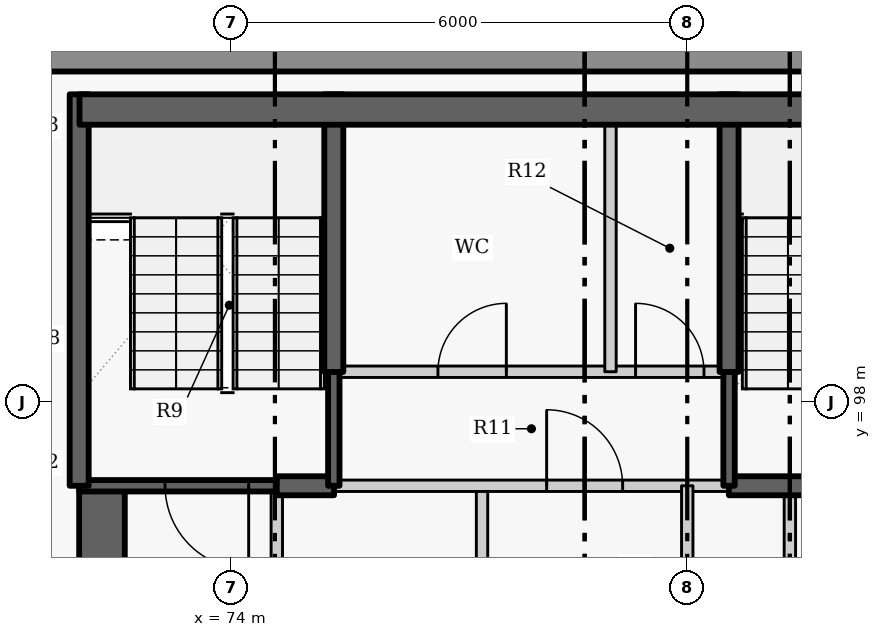
"""IFC4 building model, lengths in metres.
Left out: names, types, materials, properties, quantities, classifications, styles, units other than length and angle.
Written with IfcOpenShell. Run it as: python <this file> out.ifc"""

import sys

from ifc_helpers import new_model, si_unit, direction, frame, frame_2d, origin, place, context, subcontext, project, spatial, rectangle, extrude, element, fill, save


model = new_model("IFC4")
c1 = context("Model", 3, precision=1e-05, world=origin(), true_north=direction((0.0, 1.0)))
c2 = subcontext(c1, "Body", "Model", "MODEL_VIEW")
j1 = project(units=[si_unit("LENGTHUNIT", "METRE"), si_unit("PLANEANGLEUNIT", "RADIAN")], contexts=[c1])
p1 = place(None, origin())
s1 = spatial("IfcSite", under=j1, at=p1, CompositionType="ELEMENT")
p2 = place(p1, origin())
s2 = spatial("IfcBuilding", under=s1, at=p2, CompositionType="ELEMENT")
p3 = place(p2, frame((0.0, 0.0, 272.4)))
s3 = spatial("IfcBuildingStorey", under=s2, at=p3, CompositionType="ELEMENT", Elevation=272.4)
p4 = place(p3, frame((89.549, 102.5, 0.0), z_axis=(0.0, 0.0, 1.0), x_axis=(-1.0, 0.0, 0.0)))
e1 = element("IfcWall", 1, at=p4, inside=s3, PredefinedType="SOLIDWALL", context=c2, shape_type="SweptSolid", body=[
    extrude(rectangle(XDim=19.134, YDim=0.3, at=frame_2d((9.567, 0.0))), origin(), (0.0, 0.0, 1.0), 2.725),
])
p5 = place(p3, frame((74.6, 94.1, 0.0), z_axis=(0.0, 0.0, 1.0), x_axis=(0.0, 1.0, 0.0)))
e2 = element("IfcWall", 2, at=p5, inside=s3, PredefinedType="PARTITIONING", context=c2, shape_type="SweptSolid", body=[
    extrude(rectangle(XDim=2.8, YDim=0.15, at=frame_2d((1.4, 0.0))), origin(), (0.0, 0.0, 1.0), 3.325),
])
p6 = place(p3, frame((72.3, 87.8, -0.275), z_axis=(0.0, 0.0, 1.0), x_axis=(0.0, 1.0, 0.0)))
e3 = element("IfcWall", 3, at=p6, inside=s3, PredefinedType="SHEAR", context=c2, shape_type="SweptSolid", body=[
    extrude(rectangle(XDim=9.1, YDim=0.6, at=frame_2d((4.55, 0.0))), origin(), (0.0, 0.0, 1.0), 3.6),
])
p7 = place(p6, frame((3.85, 0.0, 0.275)))
e4 = element("IfcOpeningElement", 4, at=p7, cuts=e3, PredefinedType="OPENING", context=c2, shape_type="SweptSolid", body=[
    extrude(rectangle(XDim=1.5, YDim=2.1, at=frame_2d((0.75, 1.05))), frame((0.0, 0.31, 0.0), z_axis=(0.0, -1.0, 0.0), x_axis=(1.0, 0.0, 0.0)), (0.0, 0.0, 1.0), 0.62),
])
p8 = place(p3, frame((74.6, 96.9, -0.275), z_axis=(0.0, 0.0, 1.0), x_axis=(-1.0, 0.0, 0.0)))
e5 = element("IfcWall", 5, at=p8, inside=s3, PredefinedType="SHEAR", context=c2, shape_type="SweptSolid", body=[
    extrude(rectangle(XDim=2.6, YDim=0.15, at=frame_2d((1.3, 0.0))), origin(), (0.0, 0.0, 1.0), 3.6),
])
p9 = place(p8, frame((0.37, 0.0, 0.275)))
e6 = element("IfcOpeningElement", 6, at=p9, cuts=e5, PredefinedType="OPENING", context=c2, shape_type="SweptSolid", body=[
    extrude(rectangle(XDim=1.1, YDim=2.1, at=frame_2d((0.55, 1.05))), frame((0.0, 0.085, 0.0), z_axis=(0.0, -1.0, 0.0), x_axis=(1.0, 0.0, 0.0)), (0.0, 0.0, 1.0), 0.17),
])
p10 = place(p3, frame((77.3, 94.1, 0.0), z_axis=(0.0, 0.0, 1.0), x_axis=(0.0, 1.0, 0.0)))
e7 = element("IfcWall", 7, at=p10, inside=s3, PredefinedType="PARTITIONING", context=c2, shape_type="SweptSolid", body=[
    extrude(rectangle(XDim=2.8, YDim=0.15, at=frame_2d((1.4, 0.0))), origin(), (0.0, 0.0, 1.0), 3.325),
])
p11 = place(p3, frame((74.6, 96.9, -0.275), z_axis=(0.0, 0.0, 1.0), x_axis=(1.0, 0.0, 0.0)))
e8 = element("IfcWall", 8, at=p11, inside=s3, PredefinedType="SHEAR", context=c2, shape_type="SweptSolid", body=[
    extrude(rectangle(XDim=0.753, YDim=0.25, at=frame_2d((0.376, 0.0))), origin(), (0.0, 0.0, 1.0), 3.6),
])
p12 = place(p3, frame((80.547, 96.9, -0.275), z_axis=(0.0, 0.0, 1.0), x_axis=(1.0, 0.0, 0.0)))
e9 = element("IfcWall", 9, at=p12, inside=s3, PredefinedType="SHEAR", context=c2, shape_type="SweptSolid", body=[
    extrude(rectangle(XDim=7.453, YDim=0.25, at=frame_2d((3.727, 0.0))), origin(), (0.0, 0.0, 1.0), 3.6),
])
p13 = place(p12, frame((3.302, 0.0, 0.275)))
e10 = element("IfcOpeningElement", 10, at=p13, cuts=e9, PredefinedType="OPENING", context=c2, shape_type="SweptSolid", body=[
    extrude(rectangle(XDim=1.1, YDim=2.1, at=frame_2d((0.55, 1.05))), frame((0.0, 0.135, 0.0), z_axis=(0.0, -1.0, 0.0), x_axis=(1.0, 0.0, 0.0)), (0.0, 0.0, 1.0), 0.27),
])
p14 = place(p3, frame((75.347, 96.9, 0.0), z_axis=(0.0, 0.0, 1.0), x_axis=(1.0, 0.0, 0.0)))
e11 = element("IfcWall", 11, at=p14, inside=s3, PredefinedType="PARTITIONING", context=c2, shape_type="SweptSolid", body=[
    extrude(rectangle(XDim=5.206, YDim=0.15, at=frame_2d((2.603, 0.0))), origin(), (0.0, 0.0, 1.0), 3.325),
])
p15 = place(p14, frame((2.803, 0.0, 0.0)))
e12 = element("IfcOpeningElement", 12, at=p15, cuts=e11, PredefinedType="OPENING", context=c2, shape_type="SweptSolid", body=[
    extrude(rectangle(XDim=1.0, YDim=2.1, at=frame_2d((0.5, 1.05))), frame((0.0, 0.085, 0.0), z_axis=(0.0, -1.0, 0.0), x_axis=(1.0, 0.0, 0.0)), (0.0, 0.0, 1.0), 0.17),
])
for number, where, z_axis, x_axis in (
    (13, (80.0, 94.1, 0.0), (0.0, 0.0, 1.0), (0.0, 1.0, 0.0)),
    (14, (81.35, 94.1, 0.0), (0.0, 0.0, 1.0), (0.0, 1.0, 0.0)),
):
    element("IfcWall", number, at=place(p3, frame(where, z_axis=z_axis, x_axis=x_axis)), inside=s3, PredefinedType="PARTITIONING", context=c2, shape_type="SweptSolid", body=[
        extrude(rectangle(XDim=2.8, YDim=0.15, at=frame_2d((1.4, 0.0))), origin(), (0.0, 0.0, 1.0), 3.325),
    ])
p16 = place(p3, frame((75.35, 96.9, -0.275), z_axis=(0.0, 0.0, 1.0), x_axis=(0.0, 1.0, 0.0)))
e15 = element("IfcWall", 15, at=p16, inside=s3, PredefinedType="SHEAR", context=c2, shape_type="SweptSolid", body=[
    extrude(rectangle(XDim=1.503, YDim=0.15, at=frame_2d((0.751, 0.0))), origin(), (0.0, 0.0, 1.0), 3.6),
])
p17 = place(p3, frame((75.35, 98.397, -0.275), z_axis=(0.0, 0.0, 1.0), x_axis=(0.0, 1.0, 0.0)))
e16 = element("IfcWall", 16, at=p17, inside=s3, PredefinedType="SHEAR", context=c2, shape_type="SweptSolid", body=[
    extrude(rectangle(XDim=3.653, YDim=0.25, at=frame_2d((1.827, 0.0))), origin(), (0.0, 0.0, 1.0), 3.6),
])
p18 = place(p3, frame((72.0, 96.9, -0.275), z_axis=(0.0, 0.0, 1.0), x_axis=(0.0, 1.0, 0.0)))
e17 = element("IfcWall", 17, at=p18, inside=s3, PredefinedType="SHEAR", context=c2, shape_type="SweptSolid", body=[
    extrude(rectangle(XDim=5.15, YDim=0.25, at=frame_2d((2.575, 0.0))), origin(), (0.0, 0.0, 1.0), 3.6),
])
p19 = place(p3, frame((80.55, 96.9, -0.275), z_axis=(0.0, 0.0, 1.0), x_axis=(0.0, 1.0, 0.0)))
e18 = element("IfcWall", 18, at=p19, inside=s3, PredefinedType="SHEAR", context=c2, shape_type="SweptSolid", body=[
    extrude(rectangle(XDim=1.503, YDim=0.15, at=frame_2d((0.751, 0.0))), origin(), (0.0, 0.0, 1.0), 3.6),
])
p20 = place(p3, frame((80.55, 98.397, -0.275), z_axis=(0.0, 0.0, 1.0), x_axis=(0.0, 1.0, 0.0)))
e19 = element("IfcWall", 19, at=p20, inside=s3, PredefinedType="SHEAR", context=c2, shape_type="SweptSolid", body=[
    extrude(rectangle(XDim=3.653, YDim=0.25, at=frame_2d((1.827, 0.0))), origin(), (0.0, 0.0, 1.0), 3.6),
])
p21 = place(p3, frame((75.35, 98.4, 0.0), z_axis=(0.0, 0.0, 1.0), x_axis=(1.0, 0.0, 0.0)))
e20 = element("IfcWall", 20, at=p21, inside=s3, PredefinedType="PARTITIONING", context=c2, shape_type="SweptSolid", body=[
    extrude(rectangle(XDim=5.2, YDim=0.15, at=frame_2d((2.6, 0.0))), origin(), (0.0, 0.0, 1.0), 3.325),
])
p22 = place(p21, frame((1.37, 0.0, 0.0)))
e21 = element("IfcOpeningElement", 21, at=p22, cuts=e20, PredefinedType="OPENING", context=c2, shape_type="SweptSolid", body=[
    extrude(rectangle(XDim=0.9, YDim=2.1, at=frame_2d((0.45, 1.05))), frame((0.0, 0.085, 0.0), z_axis=(0.0, -1.0, 0.0), x_axis=(1.0, 0.0, 0.0)), (0.0, 0.0, 1.0), 0.17),
])
p23 = place(p21, frame((3.97, 0.0, 0.0)))
e22 = element("IfcOpeningElement", 22, at=p23, cuts=e20, PredefinedType="OPENING", context=c2, shape_type="SweptSolid", body=[
    extrude(rectangle(XDim=0.9, YDim=2.1, at=frame_2d((0.45, 1.05))), frame((0.0, 0.085, 0.0), z_axis=(0.0, -1.0, 0.0), x_axis=(1.0, 0.0, 0.0)), (0.0, 0.0, 1.0), 0.17),
])
p24 = place(p3, frame((78.99, 98.4, 0.0), z_axis=(0.0, 0.0, 1.0), x_axis=(0.0, 1.0, 0.0)))
e23 = element("IfcWall", 23, at=p24, inside=s3, PredefinedType="PARTITIONING", context=c2, shape_type="SweptSolid", body=[
    extrude(rectangle(XDim=3.65, YDim=0.15, at=frame_2d((1.825, 0.0))), origin(), (0.0, 0.0, 1.0), 3.325),
])
p25 = place(p3, frame((72.004, 101.85, -0.275), z_axis=(0.0, 0.0, 1.0), x_axis=(1.0, 0.0, 0.0)))
e24 = element("IfcWall", 24, at=p25, inside=s3, PredefinedType="SHEAR", context=c2, shape_type="SweptSolid", body=[
    extrude(rectangle(XDim=15.992, YDim=0.4, at=frame_2d((7.996, 0.0))), origin(), (0.0, 0.0, 1.0), 3.6),
])
p26 = place(p15, origin())
e25 = element("IfcDoor", 25, at=p26, inside=s3, OperationType="SINGLE_SWING_LEFT", PredefinedType="DOOR", context=c2, shape_type="SweptSolid", body=[
    extrude(rectangle(XDim=1.0, YDim=2.1, at=frame_2d((0.5, 1.05))), frame((0.0, 0.025, 0.0), z_axis=(0.0, -1.0, 0.0), x_axis=(1.0, 0.0, 0.0)), (0.0, 0.0, 1.0), 0.05),
])
fill(e12, e25)
p27 = place(p22, origin())
e26 = element("IfcDoor", 26, at=p27, inside=s3, OperationType="SINGLE_SWING_RIGHT", PredefinedType="DOOR", context=c2, shape_type="SweptSolid", body=[
    extrude(rectangle(XDim=0.9, YDim=2.1, at=frame_2d((0.45, 1.05))), frame((0.0, 0.025, 0.0), z_axis=(0.0, -1.0, 0.0), x_axis=(1.0, 0.0, 0.0)), (0.0, 0.0, 1.0), 0.05),
])
fill(e21, e26)
p28 = place(p23, origin())
e27 = element("IfcDoor", 27, at=p28, inside=s3, OperationType="SINGLE_SWING_LEFT", PredefinedType="DOOR", context=c2, shape_type="SweptSolid", body=[
    extrude(rectangle(XDim=0.9, YDim=2.1, at=frame_2d((0.45, 1.05))), frame((0.0, 0.025, 0.0), z_axis=(0.0, -1.0, 0.0), x_axis=(1.0, 0.0, 0.0)), (0.0, 0.0, 1.0), 0.05),
])
fill(e22, e27)
p29 = place(p9, origin())
e28 = element("IfcDoor", 28, at=p29, inside=s3, OperationType="SINGLE_SWING_LEFT", PredefinedType="DOOR", context=c2, shape_type="SweptSolid", body=[
    extrude(rectangle(XDim=1.1, YDim=2.1, at=frame_2d((0.55, 1.05))), frame((0.0, 0.025, 0.0), z_axis=(0.0, -1.0, 0.0), x_axis=(1.0, 0.0, 0.0)), (0.0, 0.0, 1.0), 0.05),
])
fill(e6, e28)
save(model, sys.argv[1])
